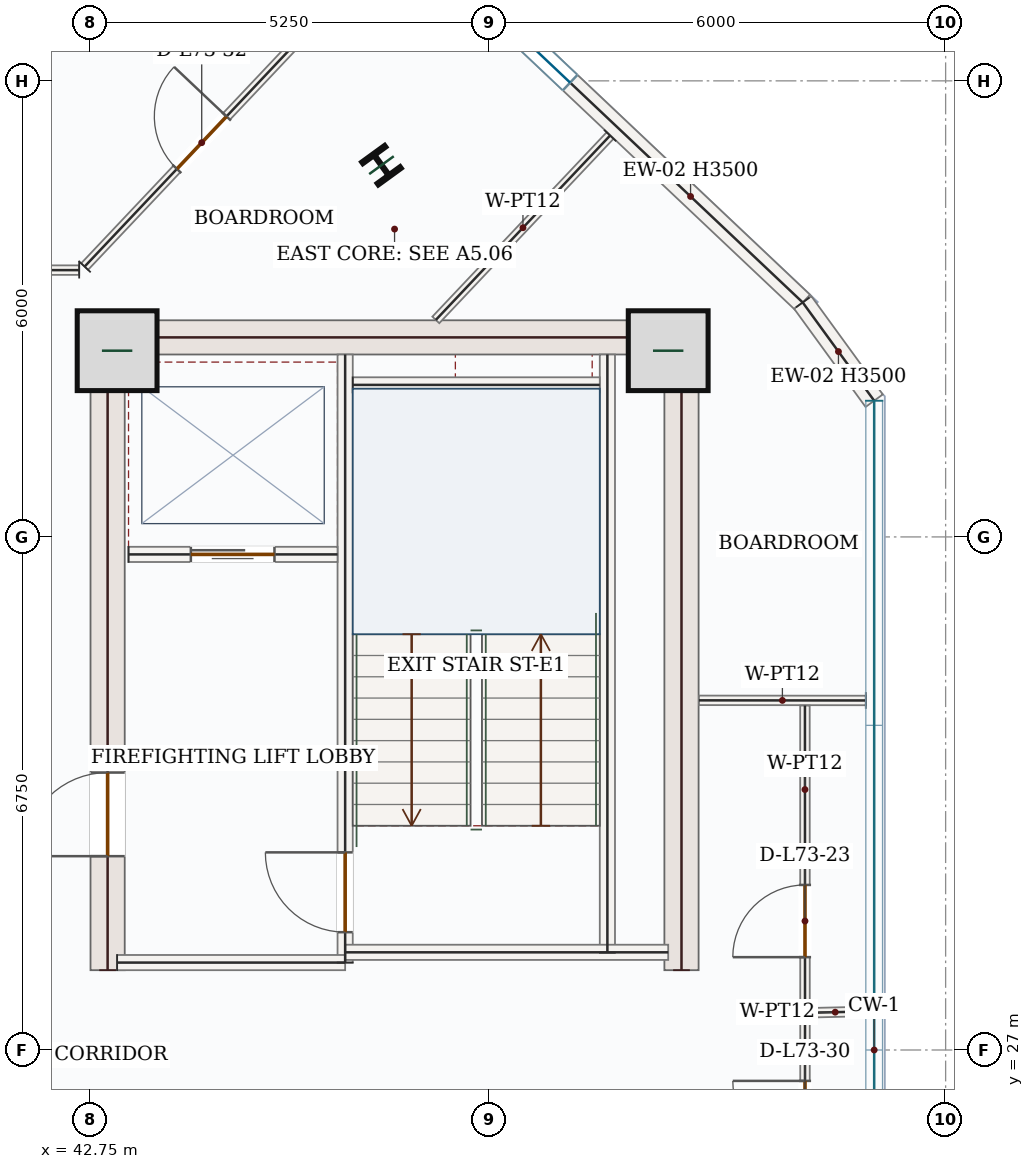
"""IFC4 building model, lengths in metres.
Left out: names, types, materials, properties, quantities, classifications, styles, units other than length and angle.
Written with IfcOpenShell. Run it as: python <this file> out.ifc"""

import sys

from ifc_helpers import new_model, si_unit, direction, frame, frame_2d, origin, origin_2d, place, context, subcontext, project, spatial, rectangle, i_section, extrude, source, transform, mapped, element, fill, save


model = new_model("IFC4")
c1 = context("Model", 3, precision=1e-05, world=origin(), true_north=direction((0.0, 1.0)))
c2 = subcontext(c1, "Body", "Model", "MODEL_VIEW")
j1 = project(units=[si_unit("LENGTHUNIT", "METRE"), si_unit("PLANEANGLEUNIT", "RADIAN")], contexts=[c1])
p1 = place(None, origin())
s1 = spatial("IfcSite", under=j1, at=p1, CompositionType="ELEMENT")
p2 = place(p1, origin())
s2 = spatial("IfcBuilding", under=s1, at=p2, CompositionType="ELEMENT")
p3 = place(p2, frame((0.0, 0.0, 302.85)))
s3 = spatial("IfcBuildingStorey", under=s2, at=p3, CompositionType="ELEMENT", Elevation=302.85)
p4 = place(p3, frame((42.975, 28.05, 0.0), z_axis=(0.0, 0.0, 1.0), x_axis=(0.0, 1.0, 0.0)))
e1 = element("IfcWall", 1, at=p4, inside=s3, PredefinedType="SHEAR", context=c2, shape_type="SweptSolid", body=[
    extrude(rectangle(XDim=8.55, YDim=0.45, at=frame_2d((4.275, 0.0))), origin(), (0.0, 0.0, 1.0), 3.5),
])
p5 = place(p4, frame((1.5, 0.0, 0.0)))
e2 = element("IfcOpeningElement", 2, at=p5, cuts=e1, PredefinedType="OPENING", context=c2, shape_type="SweptSolid", body=[
    extrude(rectangle(XDim=1.1, YDim=2.2, at=frame_2d((0.55, 1.1))), frame((0.0, 0.235, 0.0), z_axis=(0.0, -1.0, 0.0), x_axis=(1.0, 0.0, 0.0)), (0.0, 0.0, 1.0), 0.47),
])
m1 = source(origin(), c2, "Body", "SweptSolid", [
    extrude(rectangle(XDim=8.55, YDim=0.45, at=frame_2d((4.275, 0.0))), origin(), (0.0, 0.0, 1.0), 3.5),
])
p6 = place(p3, frame((50.525, 28.05, 0.0), z_axis=(0.0, 0.0, 1.0), x_axis=(0.0, 1.0, 0.0)))
e3 = element("IfcWall", 3, at=p6, inside=s3, PredefinedType="SHEAR", context=c2, shape_type="MappedRepresentation", body=[
    mapped(m1, transform((0.0, 0.0, 0.0), x_axis=(1.0, 0.0, 0.0), y_axis=(0.0, 1.0, 0.0), z_axis=(0.0, 0.0, 1.0), scale=1.0)),
])
m2 = source(origin(), c2, "Body", "SweptSolid", [
    extrude(rectangle(XDim=7.1, YDim=0.45, at=frame_2d((3.55, 0.0))), origin(), (0.0, 0.0, 1.0), 3.5),
])
p7 = place(p3, frame((43.2, 36.375, 0.0), z_axis=(0.0, 0.0, 1.0), x_axis=(1.0, 0.0, 0.0)))
e4 = element("IfcWall", 4, at=p7, inside=s3, PredefinedType="SHEAR", context=c2, shape_type="MappedRepresentation", body=[
    mapped(m2, transform((0.0, 0.0, 0.0), x_axis=(1.0, 0.0, 0.0), y_axis=(0.0, 1.0, 0.0), z_axis=(0.0, 0.0, 1.0), scale=1.0)),
])
m3 = source(origin(), c2, "Body", "SweptSolid", [
    extrude(rectangle(XDim=1.05, YDim=1.05, at=origin_2d()), origin(), (0.0, 0.0, 1.0), 3.75),
])
for number, where, z_axis, x_axis in (
    (5, (43.1, 36.2, 0.0), (0.0, 0.0, 1.0), (1.0, 0.0, 0.0)),
    (6, (50.35, 36.2, 0.0), (0.0, 0.0, 1.0), (1.0, 0.0, 0.0)),
):
    element("IfcColumn", number, at=place(p3, frame(where, z_axis=z_axis, x_axis=x_axis)), inside=s3, PredefinedType="COLUMN", context=c2, shape_type="MappedRepresentation", body=[
        mapped(m3, transform((0.0, 0.0, 0.0), x_axis=(1.0, 0.0, 0.0), y_axis=(0.0, 1.0, 0.0), z_axis=(0.0, 0.0, 1.0), scale=1.0)),
    ])
m4 = source(origin(), c2, "Body", "SweptSolid", [
    extrude(i_section(OverallWidth=0.374, OverallDepth=0.372, WebThickness=0.016, FlangeThickness=0.026, FilletRadius=0.018, at=origin_2d()), origin(), (0.0, 0.0, 1.0), 3.75),
])
p8 = place(p3, frame((46.578, 38.641, 0.0), z_axis=(0.0, 0.0, 1.0), x_axis=(0.809016994375, 0.587785252292, 0.0)))
e7 = element("IfcColumn", 7, at=p8, inside=s3, PredefinedType="COLUMN", context=c2, shape_type="MappedRepresentation", body=[
    mapped(m4, transform((0.0, 0.0, 0.0), x_axis=(1.0, 0.0, 0.0), y_axis=(0.0, 1.0, 0.0), z_axis=(0.0, 0.0, 1.0), scale=1.0)),
])
p9 = place(p3, frame((38.423, 39.26, 0.0), z_axis=(0.0, 0.0, 1.0), x_axis=(0.686888766374, 0.72676256276, 0.0)))
e8 = element("IfcWall", 8, at=p9, inside=s3, PredefinedType="SOLIDWALL", context=c2, shape_type="SweptSolid", body=[
    extrude(rectangle(XDim=5.945, YDim=0.28, at=frame_2d((2.973, 0.0))), origin(), (0.0, 0.0, 1.0), 3.5),
])
p10 = place(p9, frame((2.448, 0.0, 0.0)))
e9 = element("IfcOpeningElement", 9, at=p10, cuts=e8, PredefinedType="OPENING", context=c2, shape_type="SweptSolid", body=[
    extrude(rectangle(XDim=1.05, YDim=2.15, at=frame_2d((0.525, 1.075))), frame((0.0, 0.15, 0.0), z_axis=(0.0, -1.0, 0.0), x_axis=(1.0, 0.0, 0.0)), (0.0, 0.0, 1.0), 0.3),
])
p11 = place(p3, frame((44.91, 43.649, 0.0), z_axis=(0.0, 0.0, 1.0), x_axis=(0.726772856404, -0.686877875022, 0.0)))
e10 = element("IfcWall", 10, at=p11, inside=s3, PredefinedType="SOLIDWALL", context=c2, shape_type="SweptSolid", body=[
    extrude(rectangle(XDim=9.92, YDim=0.28, at=frame_2d((4.96, 0.0))), origin(), (0.0, 0.0, 1.0), 3.5),
])
p12 = place(p11, frame((4.21, 0.0, 0.85)))
e11 = element("IfcOpeningElement", 11, at=p12, cuts=e10, PredefinedType="OPENING", context=c2, shape_type="SweptSolid", body=[
    extrude(rectangle(XDim=1.5, YDim=1.5, at=frame_2d((0.75, 0.75))), frame((0.0, 0.15, 0.0), z_axis=(0.0, -1.0, 0.0), x_axis=(1.0, 0.0, 0.0)), (0.0, 0.0, 1.0), 0.3),
])
m5 = source(origin(), c2, "Body", "SweptSolid", [
    extrude(rectangle(XDim=1.599, YDim=0.28, at=frame_2d((0.799, 0.0))), origin(), (0.0, 0.0, 1.0), 3.5),
])
p13 = place(p3, frame((52.12, 36.835, 0.0), z_axis=(0.0, 0.0, 1.0), x_axis=(0.58820801539, -0.808709670173, 0.0)))
e12 = element("IfcWall", 12, at=p13, inside=s3, PredefinedType="SOLIDWALL", context=c2, shape_type="MappedRepresentation", body=[
    mapped(m5, transform((0.0, 0.0, 0.0), x_axis=(1.0, 0.0, 0.0), y_axis=(0.0, 1.0, 0.0), z_axis=(0.0, 0.0, 1.0), scale=1.0)),
])
m6 = source(origin(), c2, "Body", "SweptSolid", [
    extrude(rectangle(XDim=7.87, YDim=0.2, at=frame_2d((3.935, 0.0))), origin(), (0.0, 0.0, 1.0), 3.5),
])
p14 = place(p3, frame((49.55, 28.28, 0.0), z_axis=(0.0, 0.0, 1.0), x_axis=(0.0, 1.0, 0.0)))
e13 = element("IfcWall", 13, at=p14, inside=s3, PredefinedType="SOLIDWALL", context=c2, shape_type="MappedRepresentation", body=[
    mapped(m6, transform((0.0, 0.0, 0.0), x_axis=(1.0, 0.0, 0.0), y_axis=(0.0, 1.0, 0.0), z_axis=(0.0, 0.0, 1.0), scale=1.0)),
])
p15 = place(p3, frame((46.1, 28.15, 0.0), z_axis=(0.0, 0.0, 1.0), x_axis=(0.0, 1.0, 0.0)))
e14 = element("IfcWall", 14, at=p15, inside=s3, PredefinedType="SOLIDWALL", context=c2, shape_type="SweptSolid", body=[
    extrude(rectangle(XDim=8.0, YDim=0.2, at=frame_2d((4.0, 0.0))), origin(), (0.0, 0.0, 1.0), 3.5),
])
p16 = place(p15, frame((0.4, 0.0, 0.0)))
e15 = element("IfcOpeningElement", 15, at=p16, cuts=e14, PredefinedType="OPENING", context=c2, shape_type="SweptSolid", body=[
    extrude(rectangle(XDim=1.05, YDim=2.15, at=frame_2d((0.525, 1.075))), frame((0.0, 0.11, 0.0), z_axis=(0.0, -1.0, 0.0), x_axis=(1.0, 0.0, 0.0)), (0.0, 0.0, 1.0), 0.22),
])
m7 = source(origin(), c2, "Body", "SweptSolid", [
    extrude(rectangle(XDim=3.0, YDim=0.2, at=frame_2d((1.5, 0.0))), origin(), (0.0, 0.0, 1.0), 3.5),
])
p17 = place(p3, frame((43.1, 28.15, 0.0), z_axis=(0.0, 0.0, 1.0), x_axis=(1.0, 0.0, 0.0)))
e16 = element("IfcWall", 16, at=p17, inside=s3, PredefinedType="SOLIDWALL", context=c2, shape_type="MappedRepresentation", body=[
    mapped(m7, transform((0.0, 0.0, 0.0), x_axis=(1.0, 0.0, 0.0), y_axis=(0.0, 1.0, 0.0), z_axis=(0.0, 0.0, 1.0), scale=1.0)),
])
m8 = source(origin(), c2, "Body", "SweptSolid", [
    extrude(rectangle(XDim=4.25, YDim=0.2, at=frame_2d((2.125, 0.0))), origin(), (0.0, 0.0, 1.0), 3.5),
])
p18 = place(p3, frame((46.1, 28.285, 0.0), z_axis=(0.0, 0.0, 1.0), x_axis=(1.0, 0.0, 0.0)))
e17 = element("IfcWall", 17, at=p18, inside=s3, PredefinedType="SOLIDWALL", context=c2, shape_type="MappedRepresentation", body=[
    mapped(m8, transform((0.0, 0.0, 0.0), x_axis=(1.0, 0.0, 0.0), y_axis=(0.0, 1.0, 0.0), z_axis=(0.0, 0.0, 1.0), scale=1.0)),
])
m9 = source(origin(), c2, "Body", "SweptSolid", [
    extrude(rectangle(XDim=3.25, YDim=0.2, at=frame_2d((1.625, 0.0))), origin(), (0.0, 0.0, 1.0), 3.5),
])
p19 = place(p3, frame((46.2, 35.75, 0.0), z_axis=(0.0, 0.0, 1.0), x_axis=(1.0, 0.0, 0.0)))
e18 = element("IfcWall", 18, at=p19, inside=s3, PredefinedType="SOLIDWALL", context=c2, shape_type="MappedRepresentation", body=[
    mapped(m9, transform((0.0, 0.0, 0.0), x_axis=(1.0, 0.0, 0.0), y_axis=(0.0, 1.0, 0.0), z_axis=(0.0, 0.0, 1.0), scale=1.0)),
])
p20 = place(p3, frame((43.25, 33.52, 0.0), z_axis=(0.0, 0.0, 1.0), x_axis=(1.0, 0.0, 0.0)))
e19 = element("IfcWall", 19, at=p20, inside=s3, PredefinedType="SOLIDWALL", context=c2, shape_type="SweptSolid", body=[
    extrude(rectangle(XDim=2.75, YDim=0.2, at=frame_2d((1.375, 0.0))), origin(), (0.0, 0.0, 1.0), 3.5),
])
p21 = place(p20, frame((0.82, 0.0, 0.0)))
e20 = element("IfcOpeningElement", 20, at=p21, cuts=e19, PredefinedType="OPENING", context=c2, shape_type="SweptSolid", body=[
    extrude(rectangle(XDim=1.1, YDim=2.15, at=frame_2d((0.55, 1.075))), frame((0.0, 0.11, 0.0), z_axis=(0.0, -1.0, 0.0), x_axis=(1.0, 0.0, 0.0)), (0.0, 0.0, 1.0), 0.22),
])
p22 = place(p3, frame((52.149, 22.471, 0.0), z_axis=(0.0, 0.0, 1.0), x_axis=(9.7318865e-05, 0.999999995265, 0.0)))
e21 = element("IfcWall", 21, at=p22, inside=s3, PredefinedType="PARTITIONING", context=c2, shape_type="SweptSolid", body=[
    extrude(rectangle(XDim=5.017, YDim=0.125, at=frame_2d((2.509, 0.0))), origin(), (0.0, 0.0, 1.0), 3.5),
])
p23 = place(p22, frame((3.173, 0.0, 0.0)))
e22 = element("IfcOpeningElement", 22, at=p23, cuts=e21, PredefinedType="OPENING", context=c2, shape_type="SweptSolid", body=[
    extrude(rectangle(XDim=0.95, YDim=2.15, at=frame_2d((0.475, 1.075))), frame((0.0, 0.073, 0.0), z_axis=(0.0, -1.0, 0.0), x_axis=(1.0, 0.0, 0.0)), (0.0, 0.0, 1.0), 0.145),
])
m10 = source(origin(), c2, "Body", "SweptSolid", [
    extrude(rectangle(XDim=0.795, YDim=0.125, at=frame_2d((0.398, 0.0))), origin(), (0.0, 0.0, 1.0), 3.5),
])
p24 = place(p3, frame((52.15, 27.488, 0.0), z_axis=(0.0, 0.0, 1.0), x_axis=(0.999727865024, 0.023328006675, 0.0)))
e23 = element("IfcWall", 23, at=p24, inside=s3, PredefinedType="PARTITIONING", context=c2, shape_type="MappedRepresentation", body=[
    mapped(m10, transform((0.0, 0.0, 0.0), x_axis=(1.0, 0.0, 0.0), y_axis=(0.0, 1.0, 0.0), z_axis=(0.0, 0.0, 1.0), scale=1.0)),
])
m11 = source(origin(), c2, "Body", "SweptSolid", [
    extrude(rectangle(XDim=3.337, YDim=0.125, at=frame_2d((1.669, 0.0))), origin(), (0.0, 0.0, 1.0), 3.5),
])
p25 = place(p3, frame((49.585, 39.031, 0.0), z_axis=(0.0, 0.0, 1.0), x_axis=(-0.686891986515, -0.726759519278, 0.0)))
e24 = element("IfcWall", 24, at=p25, inside=s3, PredefinedType="PARTITIONING", context=c2, shape_type="MappedRepresentation", body=[
    mapped(m11, transform((0.0, 0.0, 0.0), x_axis=(1.0, 0.0, 0.0), y_axis=(0.0, 1.0, 0.0), z_axis=(0.0, 0.0, 1.0), scale=1.0)),
])
p26 = place(p3, frame((42.672, 37.306, 0.0), z_axis=(0.0, 0.0, 1.0), x_axis=(0.686871949206, 0.726778456886, 0.0)))
e25 = element("IfcWall", 25, at=p26, inside=s3, PredefinedType="PARTITIONING", context=c2, shape_type="SweptSolid", body=[
    extrude(rectangle(XDim=6.001, YDim=0.125, at=frame_2d((3.001, 0.0))), origin(), (0.0, 0.0, 1.0), 3.5),
])
p27 = place(p26, frame((1.768, 0.0, 0.0)))
e26 = element("IfcOpeningElement", 26, at=p27, cuts=e25, PredefinedType="OPENING", context=c2, shape_type="SweptSolid", body=[
    extrude(rectangle(XDim=0.95, YDim=2.15, at=frame_2d((0.475, 1.075))), frame((0.0, 0.073, 0.0), z_axis=(0.0, -1.0, 0.0), x_axis=(1.0, 0.0, 0.0)), (0.0, 0.0, 1.0), 0.145),
])
m12 = source(origin(), c2, "Body", "SweptSolid", [
    extrude(rectangle(XDim=2.195, YDim=0.125, at=frame_2d((1.098, 0.0))), origin(), (0.0, 0.0, 1.0), 3.5),
])
p28 = place(p3, frame((52.95, 31.598, 0.0), z_axis=(0.0, 0.0, 1.0), x_axis=(-0.999999696925, 0.000778556098, 0.0)))
e27 = element("IfcWall", 27, at=p28, inside=s3, PredefinedType="PARTITIONING", context=c2, shape_type="MappedRepresentation", body=[
    mapped(m12, transform((0.0, 0.0, 0.0), x_axis=(1.0, 0.0, 0.0), y_axis=(0.0, 1.0, 0.0), z_axis=(0.0, 0.0, 1.0), scale=1.0)),
])
p29 = place(p3, frame((52.15, 27.556, 0.0), z_axis=(0.0, 0.0, 1.0), x_axis=(-0.000245639885, 0.999999969831, 0.0)))
e28 = element("IfcWall", 28, at=p29, inside=s3, PredefinedType="PARTITIONING", context=c2, shape_type="SweptSolid", body=[
    extrude(rectangle(XDim=3.976, YDim=0.125, at=frame_2d((1.988, 0.0))), origin(), (0.0, 0.0, 1.0), 3.5),
])
p30 = place(p29, frame((0.666, 0.0, 0.0)))
e29 = element("IfcOpeningElement", 29, at=p30, cuts=e28, PredefinedType="OPENING", context=c2, shape_type="SweptSolid", body=[
    extrude(rectangle(XDim=0.95, YDim=2.15, at=frame_2d((0.475, 1.075))), frame((0.0, 0.073, 0.0), z_axis=(0.0, -1.0, 0.0), x_axis=(1.0, 0.0, 0.0)), (0.0, 0.0, 1.0), 0.145),
])
p31 = place(p3, frame((42.601, 37.26, 0.0), z_axis=(0.0, 0.0, 1.0), x_axis=(-1.0, 0.0, 0.0)))
e30 = element("IfcWall", 30, at=p31, inside=s3, PredefinedType="PARTITIONING", context=c2, shape_type="SweptSolid", body=[
    extrude(rectangle(XDim=6.881, YDim=0.125, at=frame_2d((3.44, 0.0))), origin(), (0.0, 0.0, 1.0), 3.5),
])
p32 = place(p31, frame((4.626, 0.0, 0.0)))
e31 = element("IfcOpeningElement", 31, at=p32, cuts=e30, PredefinedType="OPENING", context=c2, shape_type="SweptSolid", body=[
    extrude(rectangle(XDim=0.95, YDim=2.15, at=frame_2d((0.475, 1.075))), frame((0.0, 0.073, 0.0), z_axis=(0.0, -1.0, 0.0), x_axis=(1.0, 0.0, 0.0)), (0.0, 0.0, 1.0), 0.145),
])
m13 = source(origin(), c2, "Body", "SweptSolid", [
    extrude(rectangle(XDim=1.5, YDim=1.5, at=frame_2d((0.75, 0.75))), frame((0.0, 0.03, 0.0), z_axis=(0.0, -1.0, 0.0), x_axis=(1.0, 0.0, 0.0)), (0.0, 0.0, 1.0), 0.06),
])
p33 = place(p12, origin())
e32 = element("IfcWindow", 32, at=p33, inside=s3, PartitioningType="SINGLE_PANEL", PredefinedType="WINDOW", context=c2, shape_type="MappedRepresentation", body=[
    mapped(m13, transform((0.0, 0.0, 0.0), x_axis=(1.0, 0.0, 0.0), y_axis=(0.0, 1.0, 0.0), z_axis=(0.0, 0.0, 1.0), scale=1.0)),
])
fill(e11, e32)
m14 = source(origin(), c2, "Body", "SweptSolid", [
    extrude(rectangle(XDim=1.05, YDim=2.15, at=frame_2d((0.525, 1.075))), frame((0.0, 0.025, 0.0), z_axis=(0.0, -1.0, 0.0), x_axis=(1.0, 0.0, 0.0)), (0.0, 0.0, 1.0), 0.05),
])
p34 = place(p16, origin())
e33 = element("IfcDoor", 33, at=p34, inside=s3, OperationType="SINGLE_SWING_RIGHT", PredefinedType="DOOR", context=c2, shape_type="MappedRepresentation", body=[
    mapped(m14, transform((0.0, 0.0, 0.0), x_axis=(1.0, 0.0, 0.0), y_axis=(0.0, 1.0, 0.0), z_axis=(0.0, 0.0, 1.0), scale=1.0)),
])
fill(e15, e33)
m15 = source(origin(), c2, "Body", "SweptSolid", [
    extrude(rectangle(XDim=1.1, YDim=2.15, at=frame_2d((0.55, 1.075))), frame((0.0, 0.025, 0.0), z_axis=(0.0, -1.0, 0.0), x_axis=(1.0, 0.0, 0.0)), (0.0, 0.0, 1.0), 0.05),
])
p35 = place(p21, origin())
e34 = element("IfcDoor", 34, at=p35, inside=s3, OperationType="DOUBLE_DOOR_SLIDING", PredefinedType="DOOR", context=c2, shape_type="MappedRepresentation", body=[
    mapped(m15, transform((0.0, 0.0, 0.0), x_axis=(1.0, 0.0, 0.0), y_axis=(0.0, 1.0, 0.0), z_axis=(0.0, 0.0, 1.0), scale=1.0)),
])
fill(e20, e34)
m16 = source(origin(), c2, "Body", "SweptSolid", [
    extrude(rectangle(XDim=1.1, YDim=2.2, at=frame_2d((0.55, 1.1))), frame((0.0, 0.025, 0.0), z_axis=(0.0, -1.0, 0.0), x_axis=(1.0, 0.0, 0.0)), (0.0, 0.0, 1.0), 0.05),
])
p36 = place(p5, origin())
e35 = element("IfcDoor", 35, at=p36, inside=s3, OperationType="SINGLE_SWING_LEFT", PredefinedType="DOOR", context=c2, shape_type="MappedRepresentation", body=[
    mapped(m16, transform((0.0, 0.0, 0.0), x_axis=(1.0, 0.0, 0.0), y_axis=(0.0, 1.0, 0.0), z_axis=(0.0, 0.0, 1.0), scale=1.0)),
])
fill(e2, e35)
m17 = source(origin(), c2, "Body", "SweptSolid", [
    extrude(rectangle(XDim=0.95, YDim=2.15, at=frame_2d((0.475, 1.075))), frame((0.0, 0.025, 0.0), z_axis=(0.0, -1.0, 0.0), x_axis=(1.0, 0.0, 0.0)), (0.0, 0.0, 1.0), 0.05),
])
p37 = place(p30, origin())
e36 = element("IfcDoor", 36, at=p37, inside=s3, OperationType="SINGLE_SWING_LEFT", PredefinedType="DOOR", context=c2, shape_type="MappedRepresentation", body=[
    mapped(m17, transform((0.0, 0.0, 0.0), x_axis=(1.0, 0.0, 0.0), y_axis=(0.0, 1.0, 0.0), z_axis=(0.0, 0.0, 1.0), scale=1.0)),
])
fill(e29, e36)
p38 = place(p23, origin())
e37 = element("IfcDoor", 37, at=p38, inside=s3, OperationType="SINGLE_SWING_RIGHT", PredefinedType="DOOR", context=c2, shape_type="MappedRepresentation", body=[
    mapped(m17, transform((0.0, 0.0, 0.0), x_axis=(1.0, 0.0, 0.0), y_axis=(0.0, 1.0, 0.0), z_axis=(0.0, 0.0, 1.0), scale=1.0)),
])
fill(e22, e37)
p39 = place(p27, origin())
e38 = element("IfcDoor", 38, at=p39, inside=s3, OperationType="SINGLE_SWING_RIGHT", PredefinedType="DOOR", context=c2, shape_type="MappedRepresentation", body=[
    mapped(m17, transform((0.0, 0.0, 0.0), x_axis=(1.0, 0.0, 0.0), y_axis=(0.0, 1.0, 0.0), z_axis=(0.0, 0.0, 1.0), scale=1.0)),
])
fill(e26, e38)
save(model, sys.argv[1])
